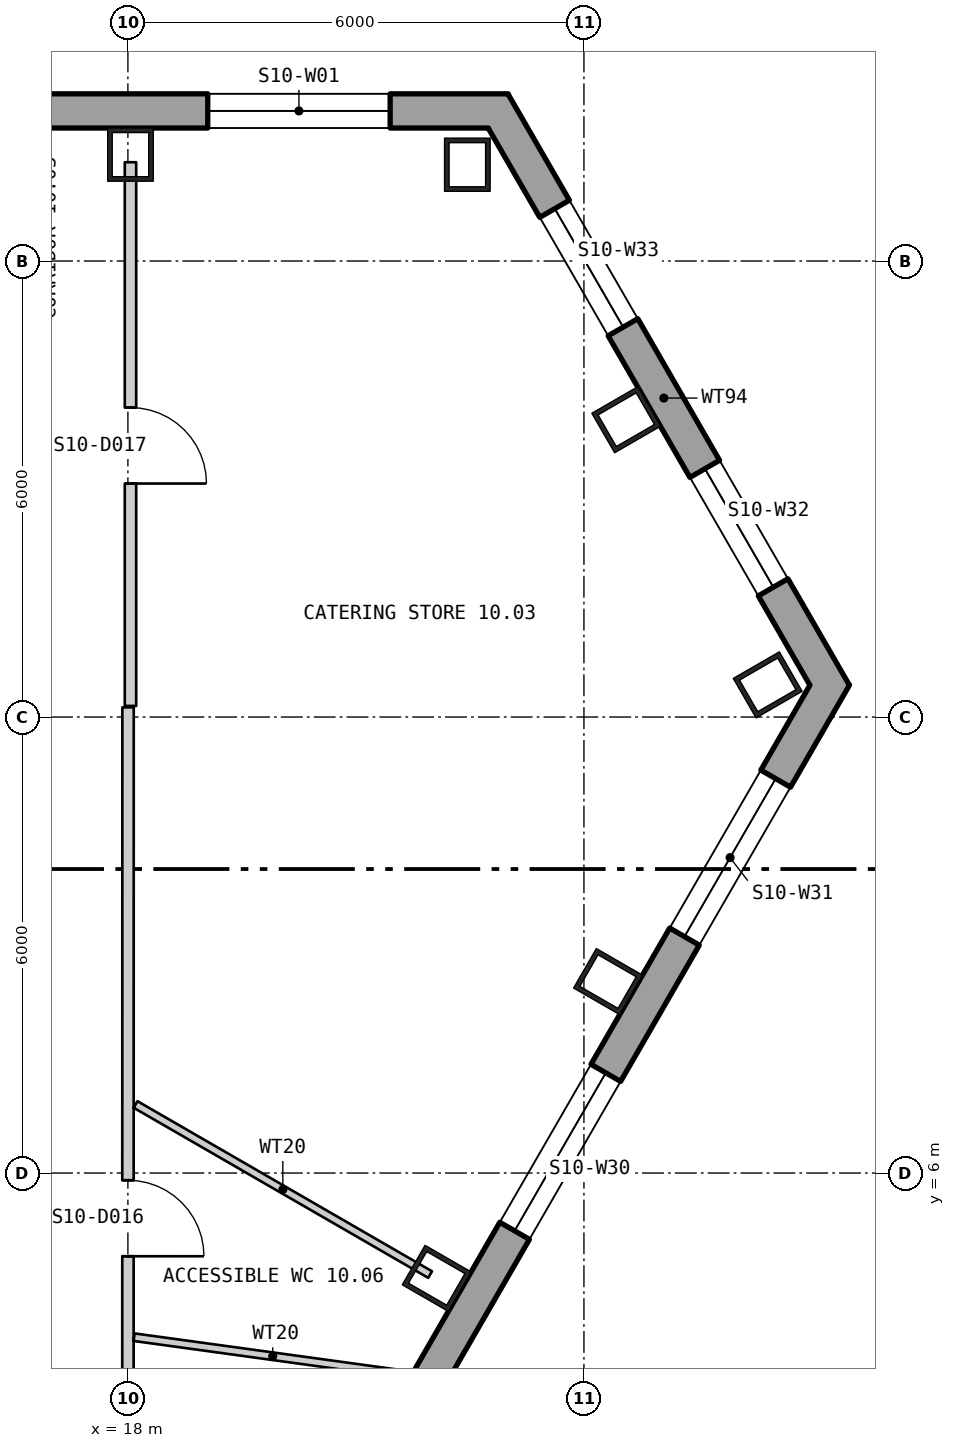
"""IFC4 building model, lengths in metres.
Left out: names, types, materials, properties, quantities, classifications, styles, units other than length and angle.
Written with IfcOpenShell. Run it as: python <this file> out.ifc"""

import sys

from ifc_helpers import new_model, si_unit, direction, frame, frame_2d, origin, origin_2d, place, context, subcontext, project, spatial, polyline, rectangle, hollow_rectangle, outline, extrude, element, fill, save


model = new_model("IFC4")
c1 = context("Model", 3, precision=1e-05, world=origin(), true_north=direction((0.0, 1.0)))
c2 = subcontext(c1, "Body", "Model", "MODEL_VIEW")
j1 = project(units=[si_unit("LENGTHUNIT", "METRE"), si_unit("PLANEANGLEUNIT", "RADIAN")], contexts=[c1])
p1 = place(None, origin())
s1 = spatial("IfcSite", under=j1, at=p1, CompositionType="ELEMENT")
p2 = place(p1, origin())
s2 = spatial("IfcBuilding", under=s1, at=p2, CompositionType="ELEMENT")
p3 = place(p2, frame((0.0, 0.0, 139.8)))
s3 = spatial("IfcBuildingStorey", under=s2, at=p3, CompositionType="ELEMENT", Elevation=139.8)
for number, where, z_axis, x_axis in (
    (1, (22.466, 19.267, 0.0), (0.0, 0.0, 1.0), (-1.0, 0.0, 0.0)),
    (2, (18.034, 19.4, 0.0), (0.0, 0.0, 1.0), (-1.0, 0.0, 0.0)),
    (3, (22.063, 4.614, 0.0), (0.0, 0.0, 1.0), (0.5, 0.866, 0.0)),
    (4, (24.317, 8.519, 0.0), (0.0, 0.0, 1.0), (0.5, 0.866, 0.0)),
    (5, (26.418, 12.423, 0.0), (0.0, 0.0, 1.0), (-0.5, 0.866, 0.0)),
    (6, (24.557, 15.912, 0.0), (0.0, 0.0, 1.0), (-0.5, 0.866, 0.0)),
):
    element("IfcColumn", number, at=place(p3, frame(where, z_axis=z_axis, x_axis=x_axis)), inside=s3, PredefinedType="COLUMN", context=c2, shape_type="SweptSolid", body=[
        extrude(hollow_rectangle(XDim=0.6, YDim=0.7, WallThickness=0.06, at=origin_2d()), origin(), (0.0, 0.0, 1.0), 3.9),
    ])
p4 = place(p3, frame((22.875, 19.975, -0.4), z_axis=(0.0, 0.0, 1.0), x_axis=(-1.0, 0.0, 0.0)))
e7 = element("IfcWall", 7, at=p4, inside=s3, PredefinedType="SOLIDWALL", context=c2, shape_type="SweptSolid", body=[
    extrude(outline(polyline([(-0.13, -0.225), (45.88, -0.225), (45.62, 0.225), (0.13, 0.225), (-0.13, -0.225)])), origin(), (0.0, 0.0, 1.0), 3.9),
])
p5 = place(p4, frame((1.425, 0.0, 1.3)))
e8 = element("IfcOpeningElement", 8, at=p5, cuts=e7, PredefinedType="OPENING", context=c2, shape_type="SweptSolid", body=[
    extrude(rectangle(XDim=2.4, YDim=2.0, at=frame_2d((1.2, 1.0))), frame((0.0, 0.235, 0.0), z_axis=(0.0, -1.0, 0.0), x_axis=(1.0, 0.0, 0.0)), (0.0, 0.0, 1.0), 0.47),
])
p6 = place(p4, frame((10.403, 0.0, 1.3)))
e9 = element("IfcOpeningElement", 9, at=p6, cuts=e7, PredefinedType="OPENING", context=c2, shape_type="SweptSolid", body=[
    extrude(rectangle(XDim=2.4, YDim=2.0, at=frame_2d((1.2, 1.0))), frame((0.0, 0.235, 0.0), z_axis=(0.0, -1.0, 0.0), x_axis=(1.0, 0.0, 0.0)), (0.0, 0.0, 1.0), 0.47),
])
p7 = place(p4, frame((14.912, 0.0, 1.3)))
e10 = element("IfcOpeningElement", 10, at=p7, cuts=e7, PredefinedType="OPENING", context=c2, shape_type="SweptSolid", body=[
    extrude(rectangle(XDim=2.4, YDim=2.0, at=frame_2d((1.2, 1.0))), frame((0.0, 0.235, 0.0), z_axis=(0.0, -1.0, 0.0), x_axis=(1.0, 0.0, 0.0)), (0.0, 0.0, 1.0), 0.47),
])
p8 = place(p4, frame((19.421, 0.0, 1.3)))
e11 = element("IfcOpeningElement", 11, at=p8, cuts=e7, PredefinedType="OPENING", context=c2, shape_type="SweptSolid", body=[
    extrude(rectangle(XDim=2.4, YDim=2.0, at=frame_2d((1.2, 1.0))), frame((0.0, 0.235, 0.0), z_axis=(0.0, -1.0, 0.0), x_axis=(1.0, 0.0, 0.0)), (0.0, 0.0, 1.0), 0.47),
])
p9 = place(p4, frame((23.929, 0.0, 1.3)))
e12 = element("IfcOpeningElement", 12, at=p9, cuts=e7, PredefinedType="OPENING", context=c2, shape_type="SweptSolid", body=[
    extrude(rectangle(XDim=2.4, YDim=2.0, at=frame_2d((1.2, 1.0))), frame((0.0, 0.235, 0.0), z_axis=(0.0, -1.0, 0.0), x_axis=(1.0, 0.0, 0.0)), (0.0, 0.0, 1.0), 0.47),
])
p10 = place(p4, frame((28.438, 0.0, 1.3)))
e13 = element("IfcOpeningElement", 13, at=p10, cuts=e7, PredefinedType="OPENING", context=c2, shape_type="SweptSolid", body=[
    extrude(rectangle(XDim=2.4, YDim=2.0, at=frame_2d((1.2, 1.0))), frame((0.0, 0.235, 0.0), z_axis=(0.0, -1.0, 0.0), x_axis=(1.0, 0.0, 0.0)), (0.0, 0.0, 1.0), 0.47),
])
p11 = place(p4, frame((32.947, 0.0, 1.3)))
e14 = element("IfcOpeningElement", 14, at=p11, cuts=e7, PredefinedType="OPENING", context=c2, shape_type="SweptSolid", body=[
    extrude(rectangle(XDim=2.4, YDim=2.0, at=frame_2d((1.2, 1.0))), frame((0.0, 0.235, 0.0), z_axis=(0.0, -1.0, 0.0), x_axis=(1.0, 0.0, 0.0)), (0.0, 0.0, 1.0), 0.47),
])
p12 = place(p4, frame((37.455, 0.0, 1.3)))
e15 = element("IfcOpeningElement", 15, at=p12, cuts=e7, PredefinedType="OPENING", context=c2, shape_type="SweptSolid", body=[
    extrude(rectangle(XDim=2.4, YDim=2.0, at=frame_2d((1.2, 1.0))), frame((0.0, 0.235, 0.0), z_axis=(0.0, -1.0, 0.0), x_axis=(1.0, 0.0, 0.0)), (0.0, 0.0, 1.0), 0.47),
])
p13 = place(p4, frame((41.925, 0.0, 1.3)))
e16 = element("IfcOpeningElement", 16, at=p13, cuts=e7, PredefinedType="OPENING", context=c2, shape_type="SweptSolid", body=[
    extrude(rectangle(XDim=2.4, YDim=2.0, at=frame_2d((1.2, 1.0))), frame((0.0, 0.235, 0.0), z_axis=(0.0, -1.0, 0.0), x_axis=(1.0, 0.0, 0.0)), (0.0, 0.0, 1.0), 0.47),
])
p14 = place(p3, frame((4.36, -27.198, -0.18), z_axis=(0.0, 0.0, 1.0), x_axis=(0.500000335318, 0.866025210188, 0.0)))
e17 = element("IfcWall", 17, at=p14, inside=s3, PredefinedType="SOLIDWALL", context=c2, shape_type="SweptSolid", body=[
    extrude(outline(polyline([(-0.13, -0.225), (45.88, -0.225), (45.62, 0.225), (0.13, 0.225), (-0.13, -0.225)])), origin(), (0.0, 0.0, 1.0), 3.68),
])
p15 = place(p14, frame((1.425, 0.0, 1.08)))
e18 = element("IfcOpeningElement", 18, at=p15, cuts=e17, PredefinedType="OPENING", context=c2, shape_type="SweptSolid", body=[
    extrude(rectangle(XDim=2.4, YDim=2.0, at=frame_2d((1.2, 1.0))), frame((0.0, 0.235, 0.0), z_axis=(0.0, -1.0, 0.0), x_axis=(1.0, 0.0, 0.0)), (0.0, 0.0, 1.0), 0.47),
])
p16 = place(p14, frame((5.895, 0.0, 1.08)))
e19 = element("IfcOpeningElement", 19, at=p16, cuts=e17, PredefinedType="OPENING", context=c2, shape_type="SweptSolid", body=[
    extrude(rectangle(XDim=2.4, YDim=2.0, at=frame_2d((1.2, 1.0))), frame((0.0, 0.235, 0.0), z_axis=(0.0, -1.0, 0.0), x_axis=(1.0, 0.0, 0.0)), (0.0, 0.0, 1.0), 0.47),
])
p17 = place(p14, frame((10.403, 0.0, 1.08)))
e20 = element("IfcOpeningElement", 20, at=p17, cuts=e17, PredefinedType="OPENING", context=c2, shape_type="SweptSolid", body=[
    extrude(rectangle(XDim=2.4, YDim=2.0, at=frame_2d((1.2, 1.0))), frame((0.0, 0.235, 0.0), z_axis=(0.0, -1.0, 0.0), x_axis=(1.0, 0.0, 0.0)), (0.0, 0.0, 1.0), 0.47),
])
p18 = place(p14, frame((14.912, 0.0, 1.08)))
e21 = element("IfcOpeningElement", 21, at=p18, cuts=e17, PredefinedType="OPENING", context=c2, shape_type="SweptSolid", body=[
    extrude(rectangle(XDim=2.4, YDim=2.0, at=frame_2d((1.2, 1.0))), frame((0.0, 0.235, 0.0), z_axis=(0.0, -1.0, 0.0), x_axis=(1.0, 0.0, 0.0)), (0.0, 0.0, 1.0), 0.47),
])
p19 = place(p14, frame((19.421, 0.0, 1.08)))
e22 = element("IfcOpeningElement", 22, at=p19, cuts=e17, PredefinedType="OPENING", context=c2, shape_type="SweptSolid", body=[
    extrude(rectangle(XDim=2.4, YDim=2.0, at=frame_2d((1.2, 1.0))), frame((0.0, 0.235, 0.0), z_axis=(0.0, -1.0, 0.0), x_axis=(1.0, 0.0, 0.0)), (0.0, 0.0, 1.0), 0.47),
])
p20 = place(p14, frame((23.929, 0.0, 1.08)))
e23 = element("IfcOpeningElement", 23, at=p20, cuts=e17, PredefinedType="OPENING", context=c2, shape_type="SweptSolid", body=[
    extrude(rectangle(XDim=2.4, YDim=2.0, at=frame_2d((1.2, 1.0))), frame((0.0, 0.235, 0.0), z_axis=(0.0, -1.0, 0.0), x_axis=(1.0, 0.0, 0.0)), (0.0, 0.0, 1.0), 0.47),
])
p21 = place(p14, frame((37.455, 0.0, 1.08)))
e24 = element("IfcOpeningElement", 24, at=p21, cuts=e17, PredefinedType="OPENING", context=c2, shape_type="SweptSolid", body=[
    extrude(rectangle(XDim=2.4, YDim=2.0, at=frame_2d((1.2, 1.0))), frame((0.0, 0.235, 0.0), z_axis=(0.0, -1.0, 0.0), x_axis=(1.0, 0.0, 0.0)), (0.0, 0.0, 1.0), 0.47),
])
p22 = place(p14, frame((41.925, 0.0, 1.08)))
e25 = element("IfcOpeningElement", 25, at=p22, cuts=e17, PredefinedType="OPENING", context=c2, shape_type="SweptSolid", body=[
    extrude(rectangle(XDim=2.4, YDim=2.0, at=frame_2d((1.2, 1.0))), frame((0.0, 0.235, 0.0), z_axis=(0.0, -1.0, 0.0), x_axis=(1.0, 0.0, 0.0)), (0.0, 0.0, 1.0), 0.47),
])
p23 = place(p3, frame((27.231, 12.421, -0.4), z_axis=(0.0, 0.0, 1.0), x_axis=(-0.500000731243, 0.866024981601, 0.0)))
e26 = element("IfcWall", 26, at=p23, inside=s3, PredefinedType="SOLIDWALL", context=c2, shape_type="SweptSolid", body=[
    extrude(outline(polyline([(-0.13, -0.225), (8.85, -0.225), (8.59, 0.225), (0.13, 0.225), (-0.13, -0.225)])), origin(), (0.0, 0.0, 1.0), 3.9),
])
p24 = place(p23, frame((1.484, 0.0, 1.3)))
e27 = element("IfcOpeningElement", 27, at=p24, cuts=e26, PredefinedType="OPENING", context=c2, shape_type="SweptSolid", body=[
    extrude(rectangle(XDim=1.8, YDim=2.0, at=frame_2d((0.9, 1.0))), frame((0.0, 0.235, 0.0), z_axis=(0.0, -1.0, 0.0), x_axis=(1.0, 0.0, 0.0)), (0.0, 0.0, 1.0), 0.47),
])
p25 = place(p23, frame((5.436, 0.0, 1.3)))
e28 = element("IfcOpeningElement", 28, at=p25, cuts=e26, PredefinedType="OPENING", context=c2, shape_type="SweptSolid", body=[
    extrude(rectangle(XDim=1.8, YDim=2.0, at=frame_2d((0.9, 1.0))), frame((0.0, 0.235, 0.0), z_axis=(0.0, -1.0, 0.0), x_axis=(1.0, 0.0, 0.0)), (0.0, 0.0, 1.0), 0.47),
])
p26 = place(p3, frame((18.0, 0.125, 0.0), z_axis=(0.0, 0.0, 1.0), x_axis=(0.000166638891, 0.999999986116, 0.0)))
e29 = element("IfcWall", 29, at=p26, inside=s3, PredefinedType="PARTITIONING", context=c2, shape_type="SweptSolid", body=[
    extrude(rectangle(XDim=12.002, YDim=0.15, at=frame_2d((6.001, 0.0))), origin(), (0.0, 0.0, 1.0), 3.7),
])
p27 = place(p26, frame((1.707, 0.0, 0.0)))
e30 = element("IfcOpeningElement", 30, at=p27, cuts=e29, PredefinedType="OPENING", context=c2, shape_type="SweptSolid", body=[
    extrude(rectangle(XDim=1.0, YDim=2.1, at=frame_2d((0.5, 1.05))), frame((0.0, 0.085, 0.0), z_axis=(0.0, -1.0, 0.0), x_axis=(1.0, 0.0, 0.0)), (0.0, 0.0, 1.0), 0.17),
])
p28 = place(p26, frame((4.78, 0.0, 0.0)))
e31 = element("IfcOpeningElement", 31, at=p28, cuts=e29, PredefinedType="OPENING", context=c2, shape_type="SweptSolid", body=[
    extrude(rectangle(XDim=1.0, YDim=2.1, at=frame_2d((0.5, 1.05))), frame((0.0, 0.085, 0.0), z_axis=(0.0, -1.0, 0.0), x_axis=(1.0, 0.0, 0.0)), (0.0, 0.0, 1.0), 0.17),
])
p29 = place(p3, frame((18.034, 12.146, 0.0), z_axis=(0.0, 0.0, 1.0), x_axis=(0.0, 1.0, 0.0)))
e32 = element("IfcWall", 32, at=p29, inside=s3, PredefinedType="PARTITIONING", context=c2, shape_type="SweptSolid", body=[
    extrude(rectangle(XDim=7.154, YDim=0.15, at=frame_2d((3.577, 0.0))), origin(), (0.0, 0.0, 1.0), 3.7),
])
p30 = place(p29, frame((2.926, 0.0, 0.0)))
e33 = element("IfcOpeningElement", 33, at=p30, cuts=e32, PredefinedType="OPENING", context=c2, shape_type="SweptSolid", body=[
    extrude(rectangle(XDim=1.0, YDim=2.1, at=frame_2d((0.5, 1.05))), frame((0.0, 0.085, 0.0), z_axis=(0.0, -1.0, 0.0), x_axis=(1.0, 0.0, 0.0)), (0.0, 0.0, 1.0), 0.17),
])
p31 = place(p3, frame((18.082, 3.84, 0.0), z_axis=(0.0, 0.0, 1.0), x_axis=(0.990695786663, -0.136095034033, 0.0)))
e34 = element("IfcWall", 34, at=p31, inside=s3, PredefinedType="PARTITIONING", context=c2, shape_type="SweptSolid", body=[
    extrude(rectangle(XDim=3.681, YDim=0.1, at=frame_2d((1.841, 0.0))), origin(), (0.0, 0.0, 1.0), 3.7),
])
p32 = place(p3, frame((18.101, 6.902, 0.0), z_axis=(0.0, 0.0, 1.0), x_axis=(0.865951106384, -0.500128664797, 0.0)))
e35 = element("IfcWall", 35, at=p32, inside=s3, PredefinedType="PARTITIONING", context=c2, shape_type="SweptSolid", body=[
    extrude(rectangle(XDim=4.475, YDim=0.1, at=frame_2d((2.237, 0.0))), origin(), (0.0, 0.0, 1.0), 3.7),
])
p33 = place(p5, origin())
e36 = element("IfcWindow", 36, at=p33, inside=s3, PartitioningType="SINGLE_PANEL", PredefinedType="WINDOW", context=c2, shape_type="SweptSolid", body=[
    extrude(rectangle(XDim=2.4, YDim=2.0, at=frame_2d((1.2, 1.0))), frame((0.0, 0.105, 0.0), z_axis=(0.0, -1.0, 0.0), x_axis=(1.0, 0.0, 0.0)), (0.0, 0.0, 1.0), 0.06),
])
fill(e8, e36)
p34 = place(p21, origin())
e37 = element("IfcWindow", 37, at=p34, inside=s3, PartitioningType="SINGLE_PANEL", PredefinedType="WINDOW", context=c2, shape_type="SweptSolid", body=[
    extrude(rectangle(XDim=2.4, YDim=2.0, at=frame_2d((1.2, 1.0))), frame((0.0, 0.105, 0.0), z_axis=(0.0, -1.0, 0.0), x_axis=(1.0, 0.0, 0.0)), (0.0, 0.0, 1.0), 0.06),
])
fill(e24, e37)
p35 = place(p22, origin())
e38 = element("IfcWindow", 38, at=p35, inside=s3, PartitioningType="SINGLE_PANEL", PredefinedType="WINDOW", context=c2, shape_type="SweptSolid", body=[
    extrude(rectangle(XDim=2.4, YDim=2.0, at=frame_2d((1.2, 1.0))), frame((0.0, 0.105, 0.0), z_axis=(0.0, -1.0, 0.0), x_axis=(1.0, 0.0, 0.0)), (0.0, 0.0, 1.0), 0.06),
])
fill(e25, e38)
p36 = place(p24, origin())
e39 = element("IfcWindow", 39, at=p36, inside=s3, PartitioningType="SINGLE_PANEL", PredefinedType="WINDOW", context=c2, shape_type="SweptSolid", body=[
    extrude(rectangle(XDim=1.8, YDim=2.0, at=frame_2d((0.9, 1.0))), frame((0.0, 0.105, 0.0), z_axis=(0.0, -1.0, 0.0), x_axis=(1.0, 0.0, 0.0)), (0.0, 0.0, 1.0), 0.06),
])
fill(e27, e39)
p37 = place(p25, origin())
e40 = element("IfcWindow", 40, at=p37, inside=s3, PartitioningType="SINGLE_PANEL", PredefinedType="WINDOW", context=c2, shape_type="SweptSolid", body=[
    extrude(rectangle(XDim=1.8, YDim=2.0, at=frame_2d((0.9, 1.0))), frame((0.0, 0.105, 0.0), z_axis=(0.0, -1.0, 0.0), x_axis=(1.0, 0.0, 0.0)), (0.0, 0.0, 1.0), 0.06),
])
fill(e28, e40)
p38 = place(p28, origin())
e41 = element("IfcDoor", 41, at=p38, inside=s3, OperationType="SINGLE_SWING_LEFT", PredefinedType="DOOR", context=c2, shape_type="SweptSolid", body=[
    extrude(rectangle(XDim=1.0, YDim=2.1, at=frame_2d((0.5, 1.05))), frame((0.0, 0.025, 0.0), z_axis=(0.0, -1.0, 0.0), x_axis=(1.0, 0.0, 0.0)), (0.0, 0.0, 1.0), 0.05),
])
fill(e31, e41)
p39 = place(p30, origin())
e42 = element("IfcDoor", 42, at=p39, inside=s3, OperationType="SINGLE_SWING_LEFT", PredefinedType="DOOR", context=c2, shape_type="SweptSolid", body=[
    extrude(rectangle(XDim=1.0, YDim=2.1, at=frame_2d((0.5, 1.05))), frame((0.0, 0.025, 0.0), z_axis=(0.0, -1.0, 0.0), x_axis=(1.0, 0.0, 0.0)), (0.0, 0.0, 1.0), 0.05),
])
fill(e33, e42)
save(model, sys.argv[1])
